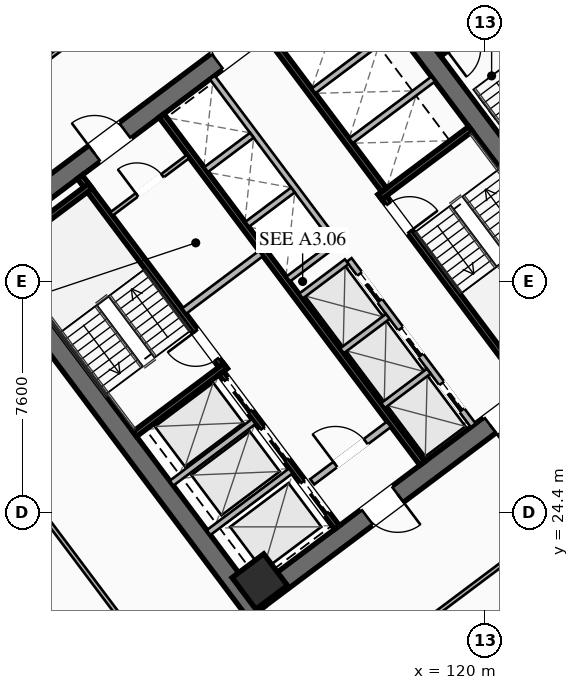
"""IFC4 building model, lengths in metres.
Left out: names, types, materials, properties, quantities, classifications, styles, units other than length and angle.
Written with IfcOpenShell. Run it as: python <this file> out.ifc"""

import sys

from ifc_helpers import new_model, si_unit, direction, frame, frame_2d, origin, origin_2d, place, context, subcontext, project, spatial, rectangle, hollow_rectangle, extrude, element, fill, save


model = new_model("IFC4")
c1 = context("Model", 3, precision=1e-05, world=origin(), true_north=direction((0.0, 1.0)))
c2 = subcontext(c1, "Body", "Model", "MODEL_VIEW")
j1 = project(units=[si_unit("LENGTHUNIT", "METRE"), si_unit("PLANEANGLEUNIT", "RADIAN")], contexts=[c1])
p1 = place(None, origin())
s1 = spatial("IfcSite", under=j1, at=p1, CompositionType="ELEMENT")
p2 = place(p1, origin())
s2 = spatial("IfcBuilding", under=s1, at=p2, CompositionType="ELEMENT")
p3 = place(p2, frame((0.0, 0.0, 92.05)))
s3 = spatial("IfcBuildingStorey", under=s2, at=p3, CompositionType="ELEMENT", Elevation=92.05)
for number, where, z_axis, x_axis in (
    (1, (112.476, 21.107, 0.0), (0.0, 0.0, 1.0), (-0.6, 0.8, 0.0)),
    (2, (115.524, 42.893, 0.0), (0.0, 0.0, 1.0), (0.6, -0.8, 0.0)),
):
    element("IfcWall", number, at=place(p3, frame(where, z_axis=z_axis, x_axis=x_axis)), inside=s3, PredefinedType="SHEAR", context=c2, shape_type="SweptSolid", body=[
        extrude(rectangle(XDim=15.6, YDim=0.65, at=frame_2d((7.8, 0.0))), origin(), (0.0, 0.0, 1.0), 3.55),
    ])
p4 = place(p3, frame((124.429, 30.478, 0.0), z_axis=(0.0, 0.0, 1.0), x_axis=(-0.799998028465, -0.600002628705, 0.0)))
e3 = element("IfcWall", 3, at=p4, inside=s3, PredefinedType="SHEAR", context=c2, shape_type="SweptSolid", body=[
    extrude(rectangle(XDim=14.86, YDim=0.65, at=frame_2d((7.43, 0.0))), origin(), (0.0, 0.0, 1.0), 3.55),
])
p5 = place(p4, frame((9.13, 0.0, 0.0)))
e4 = element("IfcOpeningElement", 4, at=p5, cuts=e3, PredefinedType="OPENING", context=c2, shape_type="SweptSolid", body=[
    extrude(rectangle(XDim=1.25, YDim=2.25, at=frame_2d((0.625, 1.125))), frame((0.0, 0.335, 0.0), z_axis=(0.0, -1.0, 0.0), x_axis=(1.0, 0.0, 0.0)), (0.0, 0.0, 1.0), 0.67),
])
p6 = place(p4, frame((4.08, 0.0, 0.0)))
e5 = element("IfcOpeningElement", 5, at=p6, cuts=e3, PredefinedType="OPENING", context=c2, shape_type="SweptSolid", body=[
    extrude(rectangle(XDim=1.25, YDim=2.25, at=frame_2d((0.625, 1.125))), frame((0.0, 0.335, 0.0), z_axis=(0.0, -1.0, 0.0), x_axis=(1.0, 0.0, 0.0)), (0.0, 0.0, 1.0), 0.67),
])
p7 = place(p3, frame((103.571, 33.522, 0.0), z_axis=(0.0, 0.0, 1.0), x_axis=(0.799998028465, 0.600002628705, 0.0)))
e6 = element("IfcWall", 6, at=p7, inside=s3, PredefinedType="SHEAR", context=c2, shape_type="SweptSolid", body=[
    extrude(rectangle(XDim=14.86, YDim=0.65, at=frame_2d((7.43, 0.0))), origin(), (0.0, 0.0, 1.0), 3.55),
])
p8 = place(p7, frame((4.48, 0.0, 0.0)))
e7 = element("IfcOpeningElement", 7, at=p8, cuts=e6, PredefinedType="OPENING", context=c2, shape_type="SweptSolid", body=[
    extrude(rectangle(XDim=1.25, YDim=2.25, at=frame_2d((0.625, 1.125))), frame((0.0, 0.335, 0.0), z_axis=(0.0, -1.0, 0.0), x_axis=(1.0, 0.0, 0.0)), (0.0, 0.0, 1.0), 0.67),
])
p9 = place(p7, frame((9.53, 0.0, 0.0)))
e8 = element("IfcOpeningElement", 8, at=p9, cuts=e6, PredefinedType="OPENING", context=c2, shape_type="SweptSolid", body=[
    extrude(rectangle(XDim=1.25, YDim=2.25, at=frame_2d((0.625, 1.125))), frame((0.0, 0.335, 0.0), z_axis=(0.0, -1.0, 0.0), x_axis=(1.0, 0.0, 0.0)), (0.0, 0.0, 1.0), 0.67),
])
p10 = place(p3, frame((112.59, 22.13, 0.0), z_axis=(0.0, 0.0, 1.0), x_axis=(0.799999996291, 0.600000004945, 0.0)))
e9 = element("IfcColumn", 9, at=p10, inside=s3, PredefinedType="COLUMN", context=c2, shape_type="SweptSolid", body=[
    extrude(hollow_rectangle(XDim=1.3, YDim=1.3, WallThickness=0.05, at=origin_2d()), origin(), (0.0, 0.0, 1.0), 3.35),
])
p11 = place(p3, frame((111.44, 29.08, 0.0), z_axis=(0.0, 0.0, 1.0), x_axis=(-0.600009827119, 0.799992629566, 0.0)))
e10 = element("IfcWall", 10, at=p11, inside=s3, PredefinedType="SHEAR", context=c2, shape_type="SweptSolid", body=[
    extrude(rectangle(XDim=7.95, YDim=0.2, at=frame_2d((3.975, 0.0))), origin(), (0.0, 0.0, 1.0), 3.35),
])
p12 = place(p11, frame((0.45, 0.0, 0.0)))
e11 = element("IfcOpeningElement", 11, at=p12, cuts=e10, PredefinedType="OPENING", context=c2, shape_type="SweptSolid", body=[
    extrude(rectangle(XDim=1.15, YDim=2.2, at=frame_2d((0.575, 1.1))), frame((0.0, 0.11, 0.0), z_axis=(0.0, -1.0, 0.0), x_axis=(1.0, 0.0, 0.0)), (0.0, 0.0, 1.0), 0.22),
])
for number, where, z_axis, x_axis in (
    (12, (108.476, 26.982, 0.0), (0.0, 0.0, 1.0), (0.8, 0.6, 0.0)),
    (13, (104.036, 32.902, 0.0), (0.0, 0.0, 1.0), (0.8, 0.6, 0.0)),
):
    element("IfcWall", number, at=place(p3, frame(where, z_axis=z_axis, x_axis=x_axis)), inside=s3, PredefinedType="SHEAR", context=c2, shape_type="SweptSolid", body=[
        extrude(rectangle(XDim=3.73, YDim=0.2, at=frame_2d((1.865, 0.0))), origin(), (0.0, 0.0, 1.0), 3.35),
    ])
p13 = place(p3, frame((116.56, 34.92, 0.0), z_axis=(0.0, 0.0, 1.0), x_axis=(0.600009827119, -0.799992629566, 0.0)))
e14 = element("IfcWall", 14, at=p13, inside=s3, PredefinedType="SHEAR", context=c2, shape_type="SweptSolid", body=[
    extrude(rectangle(XDim=7.95, YDim=0.2, at=frame_2d((3.975, 0.0))), origin(), (0.0, 0.0, 1.0), 3.35),
])
p14 = place(p13, frame((0.45, 0.0, 0.0)))
e15 = element("IfcOpeningElement", 15, at=p14, cuts=e14, PredefinedType="OPENING", context=c2, shape_type="SweptSolid", body=[
    extrude(rectangle(XDim=1.15, YDim=2.2, at=frame_2d((0.575, 1.1))), frame((0.0, 0.11, 0.0), z_axis=(0.0, -1.0, 0.0), x_axis=(1.0, 0.0, 0.0)), (0.0, 0.0, 1.0), 0.22),
])
p15 = place(p3, frame((116.54, 34.78, 0.0), z_axis=(0.0, 0.0, 1.0), x_axis=(0.799984290658, 0.600020945218, 0.0)))
e16 = element("IfcWall", 16, at=p15, inside=s3, PredefinedType="SHEAR", context=c2, shape_type="SweptSolid", body=[
    extrude(rectangle(XDim=3.73, YDim=0.2, at=frame_2d((1.865, 0.0))), origin(), (0.0, 0.0, 1.0), 3.35),
])
p16 = place(p3, frame((117.938, 26.016, 0.0), z_axis=(0.0, 0.0, 1.0), x_axis=(-0.600005463273, 0.799995902516, 0.0)))
e17 = element("IfcWall", 17, at=p16, inside=s3, PredefinedType="SHEAR", context=c2, shape_type="SweptSolid", body=[
    extrude(rectangle(XDim=14.3, YDim=0.2, at=frame_2d((7.15, 0.0))), origin(), (0.0, 0.0, 1.0), 3.35),
])
p17 = place(p3, frame((110.104, 31.028, 0.0), z_axis=(0.0, 0.0, 1.0), x_axis=(0.800018601094, 0.59997519774, 0.0)))
e18 = element("IfcWall", 18, at=p17, inside=s3, PredefinedType="SOLIDWALL", context=c2, shape_type="SweptSolid", body=[
    extrude(rectangle(XDim=3.15, YDim=0.22, at=frame_2d((1.575, 0.0))), origin(), (0.0, 0.0, 1.0), 2.703),
])
p18 = place(p3, frame((114.316, 25.412, 0.0), z_axis=(0.0, 0.0, 1.0), x_axis=(0.800018601094, 0.59997519774, 0.0)))
e19 = element("IfcWall", 19, at=p18, inside=s3, PredefinedType="SOLIDWALL", context=c2, shape_type="SweptSolid", body=[
    extrude(rectangle(XDim=3.15, YDim=0.22, at=frame_2d((1.575, 0.0))), origin(), (0.0, 0.0, 1.0), 2.703),
])
p19 = place(p18, frame((0.95, 0.0, 0.0)))
e20 = element("IfcOpeningElement", 20, at=p19, cuts=e19, PredefinedType="OPENING", context=c2, shape_type="SweptSolid", body=[
    extrude(rectangle(XDim=1.25, YDim=2.25, at=frame_2d((0.625, 1.125))), frame((0.0, 0.12, 0.0), z_axis=(0.0, -1.0, 0.0), x_axis=(1.0, 0.0, 0.0)), (0.0, 0.0, 1.0), 0.24),
])
p20 = place(p3, frame((115.13, 23.91, 0.0), z_axis=(0.0, 0.0, 1.0), x_axis=(-0.599975393228, 0.800018454488, 0.0)))
e21 = element("IfcWall", 21, at=p20, inside=s3, PredefinedType="SHEAR", context=c2, shape_type="SweptSolid", body=[
    extrude(rectangle(XDim=6.35, YDim=0.2, at=frame_2d((3.175, 0.0))), origin(), (0.0, 0.0, 1.0), 3.35),
])
p21 = place(p20, frame((4.775, 0.0, 0.0)))
e22 = element("IfcOpeningElement", 22, at=p21, cuts=e21, PredefinedType="OPENING", context=c2, shape_type="SweptSolid", body=[
    extrude(rectangle(XDim=1.3, YDim=2.25, at=frame_2d((0.65, 1.125))), frame((0.0, 0.11, 0.0), z_axis=(0.0, -1.0, 0.0), x_axis=(1.0, 0.0, 0.0)), (0.0, 0.0, 1.0), 0.22),
])
p22 = place(p20, frame((2.775, 0.0, 0.0)))
e23 = element("IfcOpeningElement", 23, at=p22, cuts=e21, PredefinedType="OPENING", context=c2, shape_type="SweptSolid", body=[
    extrude(rectangle(XDim=1.3, YDim=2.25, at=frame_2d((0.65, 1.125))), frame((0.0, 0.11, 0.0), z_axis=(0.0, -1.0, 0.0), x_axis=(1.0, 0.0, 0.0)), (0.0, 0.0, 1.0), 0.22),
])
p23 = place(p20, frame((0.575, 0.0, 0.0)))
e24 = element("IfcOpeningElement", 24, at=p23, cuts=e21, PredefinedType="OPENING", context=c2, shape_type="SweptSolid", body=[
    extrude(rectangle(XDim=1.3, YDim=2.25, at=frame_2d((0.65, 1.125))), frame((0.0, 0.11, 0.0), z_axis=(0.0, -1.0, 0.0), x_axis=(1.0, 0.0, 0.0)), (0.0, 0.0, 1.0), 0.22),
])
for number, where, z_axis, x_axis in (
    (25, (110.906, 23.742, 0.0), (0.0, 0.0, 1.0), (0.8, 0.6, 0.0)),
    (26, (109.688, 25.366, 0.0), (0.0, 0.0, 1.0), (0.8, 0.6, 0.0)),
):
    element("IfcWall", number, at=place(p3, frame(where, z_axis=z_axis, x_axis=x_axis)), inside=s3, PredefinedType="SOLIDWALL", context=c2, shape_type="SweptSolid", body=[
        extrude(rectangle(XDim=3.38, YDim=0.2, at=frame_2d((1.69, 0.0))), origin(), (0.0, 0.0, 1.0), 3.35),
    ])
p24 = place(p3, frame((112.87, 40.09, 0.0), z_axis=(0.0, 0.0, 1.0), x_axis=(0.599975393228, -0.800018454488, 0.0)))
e27 = element("IfcWall", 27, at=p24, inside=s3, PredefinedType="SHEAR", context=c2, shape_type="SweptSolid", body=[
    extrude(rectangle(XDim=6.35, YDim=0.2, at=frame_2d((3.175, 0.0))), origin(), (0.0, 0.0, 1.0), 3.35),
])
for number, where, z_axis, x_axis in (
    (28, (115.59, 36.63, 0.0), (0.0, 0.0, 1.0), (0.8, 0.6, 0.0)),
    (29, (114.36, 38.27, 0.0), (0.0, 0.0, 1.0), (0.8, 0.6, 0.0)),
):
    element("IfcWall", number, at=place(p3, frame(where, z_axis=z_axis, x_axis=x_axis)), inside=s3, PredefinedType="SOLIDWALL", context=c2, shape_type="SweptSolid", body=[
        extrude(rectangle(XDim=3.38, YDim=0.2, at=frame_2d((1.69, 0.0))), origin(), (0.0, 0.0, 1.0), 3.35),
    ])
p25 = place(p3, frame((107.71, 34.22, 0.0), z_axis=(0.0, 0.0, 1.0), x_axis=(0.799981399002, 0.60002480053, 0.0)))
e30 = element("IfcWall", 30, at=p25, inside=s3, PredefinedType="PARTITIONING", context=c2, shape_type="SweptSolid", body=[
    extrude(rectangle(XDim=3.15, YDim=0.135, at=frame_2d((1.575, 0.0))), origin(), (0.0, 0.0, 1.0), 2.703),
])
p26 = place(p25, frame((1.05, 0.0, 0.0)))
e31 = element("IfcOpeningElement", 31, at=p26, cuts=e30, PredefinedType="OPENING", context=c2, shape_type="SweptSolid", body=[
    extrude(rectangle(XDim=1.05, YDim=2.2, at=frame_2d((0.525, 1.1))), frame((0.0, 0.077, 0.0), z_axis=(0.0, -1.0, 0.0), x_axis=(1.0, 0.0, 0.0)), (0.0, 0.0, 1.0), 0.155),
])
p27 = place(p3, frame((119.61, 27.27, 0.0), z_axis=(0.0, 0.0, 1.0), x_axis=(-0.600011488909, 0.79999138319, 0.0)))
e32 = element("IfcWall", 32, at=p27, inside=s3, PredefinedType="SOLIDWALL", context=c2, shape_type="SweptSolid", body=[
    extrude(rectangle(XDim=6.8, YDim=0.2, at=frame_2d((3.4, 0.0))), origin(), (0.0, 0.0, 1.0), 3.35),
])
p28 = place(p27, frame((0.625, 0.0, 0.0)))
e33 = element("IfcOpeningElement", 33, at=p28, cuts=e32, PredefinedType="OPENING", context=c2, shape_type="SweptSolid", body=[
    extrude(rectangle(XDim=1.1, YDim=2.2, at=frame_2d((0.55, 1.1))), frame((0.0, 0.11, 0.0), z_axis=(0.0, -1.0, 0.0), x_axis=(1.0, 0.0, 0.0)), (0.0, 0.0, 1.0), 0.22),
])
p29 = place(p27, frame((2.875, 0.0, 0.0)))
e34 = element("IfcOpeningElement", 34, at=p29, cuts=e32, PredefinedType="OPENING", context=c2, shape_type="SweptSolid", body=[
    extrude(rectangle(XDim=1.1, YDim=2.2, at=frame_2d((0.55, 1.1))), frame((0.0, 0.11, 0.0), z_axis=(0.0, -1.0, 0.0), x_axis=(1.0, 0.0, 0.0)), (0.0, 0.0, 1.0), 0.22),
])
p30 = place(p27, frame((5.125, 0.0, 0.0)))
e35 = element("IfcOpeningElement", 35, at=p30, cuts=e32, PredefinedType="OPENING", context=c2, shape_type="SweptSolid", body=[
    extrude(rectangle(XDim=1.1, YDim=2.2, at=frame_2d((0.55, 1.1))), frame((0.0, 0.11, 0.0), z_axis=(0.0, -1.0, 0.0), x_axis=(1.0, 0.0, 0.0)), (0.0, 0.0, 1.0), 0.22),
])
p31 = place(p3, frame((116.646, 27.922, 0.0), z_axis=(0.0, 0.0, 1.0), x_axis=(0.8, 0.6, 0.0)))
e36 = element("IfcWall", 36, at=p31, inside=s3, PredefinedType="SOLIDWALL", context=c2, shape_type="SweptSolid", body=[
    extrude(rectangle(XDim=1.88, YDim=0.2, at=frame_2d((0.94, 0.0))), origin(), (0.0, 0.0, 1.0), 3.35),
])
p32 = place(p3, frame((115.296, 29.722, 0.0), z_axis=(0.0, 0.0, 1.0), x_axis=(0.799984418148, 0.600020775241, 0.0)))
e37 = element("IfcWall", 37, at=p32, inside=s3, PredefinedType="SOLIDWALL", context=c2, shape_type="SweptSolid", body=[
    extrude(rectangle(XDim=1.88, YDim=0.2, at=frame_2d((0.94, 0.0))), origin(), (0.0, 0.0, 1.0), 3.35),
])
p33 = place(p3, frame((113.946, 31.522, 0.0), z_axis=(0.0, 0.0, 1.0), x_axis=(0.8, 0.6, 0.0)))
e38 = element("IfcWall", 38, at=p33, inside=s3, PredefinedType="SOLIDWALL", context=c2, shape_type="SweptSolid", body=[
    extrude(rectangle(XDim=1.88, YDim=0.2, at=frame_2d((0.94, 0.0))), origin(), (0.0, 0.0, 1.0), 3.35),
])
p34 = place(p3, frame((115.11, 33.27, 0.0), z_axis=(0.0, 0.0, 1.0), x_axis=(-0.600011488909, 0.79999138319, 0.0)))
e39 = element("IfcWall", 39, at=p34, inside=s3, PredefinedType="SOLIDWALL", context=c2, shape_type="SweptSolid", body=[
    extrude(rectangle(XDim=6.8, YDim=0.2, at=frame_2d((3.4, 0.0))), origin(), (0.0, 0.0, 1.0), 3.35),
])
p35 = place(p3, frame((113.526, 32.082, 0.0), z_axis=(0.0, 0.0, 1.0), x_axis=(0.800046745961, 0.599937666993, 0.0)))
e40 = element("IfcWall", 40, at=p35, inside=s3, PredefinedType="SOLIDWALL", context=c2, shape_type="SweptSolid", body=[
    extrude(rectangle(XDim=1.88, YDim=0.2, at=frame_2d((0.94, 0.0))), origin(), (0.0, 0.0, 1.0), 3.35),
])
p36 = place(p3, frame((112.176, 33.882, 0.0), z_axis=(0.0, 0.0, 1.0), x_axis=(0.8, 0.6, 0.0)))
e41 = element("IfcWall", 41, at=p36, inside=s3, PredefinedType="SOLIDWALL", context=c2, shape_type="SweptSolid", body=[
    extrude(rectangle(XDim=1.88, YDim=0.2, at=frame_2d((0.94, 0.0))), origin(), (0.0, 0.0, 1.0), 3.35),
])
p37 = place(p3, frame((110.826, 35.682, 0.0), z_axis=(0.0, 0.0, 1.0), x_axis=(0.799984418148, 0.600020775241, 0.0)))
e42 = element("IfcWall", 42, at=p37, inside=s3, PredefinedType="SOLIDWALL", context=c2, shape_type="SweptSolid", body=[
    extrude(rectangle(XDim=1.88, YDim=0.2, at=frame_2d((0.94, 0.0))), origin(), (0.0, 0.0, 1.0), 3.35),
])
p38 = place(p3, frame((121.204, 41.528, 0.0), z_axis=(0.0, 0.0, 1.0), x_axis=(-0.800017232136, -0.599977023131, 0.0)))
e43 = element("IfcWall", 43, at=p38, inside=s3, PredefinedType="SHEAR", context=c2, shape_type="SweptSolid", body=[
    extrude(rectangle(XDim=3.4, YDim=0.2, at=frame_2d((1.7, 0.0))), origin(), (0.0, 0.0, 1.0), 3.35),
])
p39 = place(p38, frame((1.975, 0.0, 0.0)))
e44 = element("IfcOpeningElement", 44, at=p39, cuts=e43, PredefinedType="OPENING", context=c2, shape_type="SweptSolid", body=[
    extrude(rectangle(XDim=1.15, YDim=2.2, at=frame_2d((0.575, 1.1))), frame((0.0, 0.11, 0.0), z_axis=(0.0, -1.0, 0.0), x_axis=(1.0, 0.0, 0.0)), (0.0, 0.0, 1.0), 0.22),
])
p40 = place(p3, frame((98.316, 33.862, 0.0), z_axis=(0.0, 0.0, 1.0), x_axis=(0.8000041147, 0.599994513695, 0.0)))
e45 = element("IfcWall", 45, at=p40, inside=s3, PredefinedType="PARTITIONING", context=c2, shape_type="SweptSolid", body=[
    extrude(rectangle(XDim=28.48, YDim=0.135, at=frame_2d((14.24, 0.0))), origin(), (0.0, 0.0, 1.0), 2.703),
])
p41 = place(p40, frame((0.3, 0.0, 0.0)))
e46 = element("IfcOpeningElement", 46, at=p41, cuts=e45, PredefinedType="OPENING", context=c2, shape_type="SweptSolid", body=[
    extrude(rectangle(XDim=0.95, YDim=2.05, at=frame_2d((0.475, 1.025))), frame((0.0, 0.077, 0.0), z_axis=(0.0, -1.0, 0.0), x_axis=(1.0, 0.0, 0.0)), (0.0, 0.0, 1.0), 0.155),
])
p42 = place(p40, frame((7.195, 0.0, 0.0)))
e47 = element("IfcOpeningElement", 47, at=p42, cuts=e45, PredefinedType="OPENING", context=c2, shape_type="SweptSolid", body=[
    extrude(rectangle(XDim=0.95, YDim=2.05, at=frame_2d((0.475, 1.025))), frame((0.0, 0.077, 0.0), z_axis=(0.0, -1.0, 0.0), x_axis=(1.0, 0.0, 0.0)), (0.0, 0.0, 1.0), 0.155),
])
p43 = place(p40, frame((11.222, 0.0, 0.0)))
e48 = element("IfcOpeningElement", 48, at=p43, cuts=e45, PredefinedType="OPENING", context=c2, shape_type="SweptSolid", body=[
    extrude(rectangle(XDim=0.95, YDim=2.05, at=frame_2d((0.475, 1.025))), frame((0.0, 0.077, 0.0), z_axis=(0.0, -1.0, 0.0), x_axis=(1.0, 0.0, 0.0)), (0.0, 0.0, 1.0), 0.155),
])
p44 = place(p40, frame((27.23, 0.0, 0.0)))
e49 = element("IfcOpeningElement", 49, at=p44, cuts=e45, PredefinedType="OPENING", context=c2, shape_type="SweptSolid", body=[
    extrude(rectangle(XDim=0.95, YDim=2.05, at=frame_2d((0.475, 1.025))), frame((0.0, 0.077, 0.0), z_axis=(0.0, -1.0, 0.0), x_axis=(1.0, 0.0, 0.0)), (0.0, 0.0, 1.0), 0.155),
])
p45 = place(p3, frame((134.462, 33.134, 0.0), z_axis=(0.0, 0.0, 1.0), x_axis=(-0.799996913945, -0.600004114717, 0.0)))
e50 = element("IfcWall", 50, at=p45, inside=s3, PredefinedType="PARTITIONING", context=c2, shape_type="SweptSolid", body=[
    extrude(rectangle(XDim=28.48, YDim=0.135, at=frame_2d((14.24, 0.0))), origin(), (0.0, 0.0, 1.0), 2.703),
])
p46 = place(p45, frame((27.15, 0.0, 0.0)))
e51 = element("IfcOpeningElement", 51, at=p46, cuts=e50, PredefinedType="OPENING", context=c2, shape_type="SweptSolid", body=[
    extrude(rectangle(XDim=0.95, YDim=2.05, at=frame_2d((0.475, 1.025))), frame((0.0, 0.077, 0.0), z_axis=(0.0, -1.0, 0.0), x_axis=(1.0, 0.0, 0.0)), (0.0, 0.0, 1.0), 0.155),
])
p47 = place(p45, frame((0.38, 0.0, 0.0)))
e52 = element("IfcOpeningElement", 52, at=p47, cuts=e50, PredefinedType="OPENING", context=c2, shape_type="SweptSolid", body=[
    extrude(rectangle(XDim=0.95, YDim=2.05, at=frame_2d((0.475, 1.025))), frame((0.0, 0.077, 0.0), z_axis=(0.0, -1.0, 0.0), x_axis=(1.0, 0.0, 0.0)), (0.0, 0.0, 1.0), 0.155),
])
p48 = place(p3, frame((111.63, 16.11, 0.0), z_axis=(0.0, 0.0, 1.0), x_axis=(-0.599996466511, 0.800002650104, 0.0)))
e53 = element("IfcWall", 53, at=p48, inside=s3, PredefinedType="PARTITIONING", context=c2, shape_type="SweptSolid", body=[
    extrude(rectangle(XDim=22.11, YDim=0.135, at=frame_2d((11.055, 0.0))), origin(), (0.0, 0.0, 1.0), 2.703),
])
p49 = place(p48, frame((0.3, 0.0, 0.0)))
e54 = element("IfcOpeningElement", 54, at=p49, cuts=e53, PredefinedType="OPENING", context=c2, shape_type="SweptSolid", body=[
    extrude(rectangle(XDim=0.95, YDim=2.05, at=frame_2d((0.475, 1.025))), frame((0.0, 0.077, 0.0), z_axis=(0.0, -1.0, 0.0), x_axis=(1.0, 0.0, 0.0)), (0.0, 0.0, 1.0), 0.155),
])
p50 = place(p8, origin())
e55 = element("IfcDoor", 55, at=p50, inside=s3, OperationType="SINGLE_SWING_LEFT", PredefinedType="DOOR", context=c2, shape_type="SweptSolid", body=[
    extrude(rectangle(XDim=1.25, YDim=2.25, at=frame_2d((0.625, 1.125))), frame((0.0, 0.025, 0.0), z_axis=(0.0, -1.0, 0.0), x_axis=(1.0, 0.0, 0.0)), (0.0, 0.0, 1.0), 0.05),
])
fill(e7, e55)
p51 = place(p9, origin())
e56 = element("IfcDoor", 56, at=p51, inside=s3, OperationType="SINGLE_SWING_RIGHT", PredefinedType="DOOR", context=c2, shape_type="SweptSolid", body=[
    extrude(rectangle(XDim=1.25, YDim=2.25, at=frame_2d((0.625, 1.125))), frame((0.0, 0.025, 0.0), z_axis=(0.0, -1.0, 0.0), x_axis=(1.0, 0.0, 0.0)), (0.0, 0.0, 1.0), 0.05),
])
fill(e8, e56)
p52 = place(p5, origin())
e57 = element("IfcDoor", 57, at=p52, inside=s3, OperationType="SINGLE_SWING_LEFT", PredefinedType="DOOR", context=c2, shape_type="SweptSolid", body=[
    extrude(rectangle(XDim=1.25, YDim=2.25, at=frame_2d((0.625, 1.125))), frame((0.0, 0.025, 0.0), z_axis=(0.0, -1.0, 0.0), x_axis=(1.0, 0.0, 0.0)), (0.0, 0.0, 1.0), 0.05),
])
fill(e4, e57)
p53 = place(p6, origin())
e58 = element("IfcDoor", 58, at=p53, inside=s3, OperationType="SINGLE_SWING_RIGHT", PredefinedType="DOOR", context=c2, shape_type="SweptSolid", body=[
    extrude(rectangle(XDim=1.25, YDim=2.25, at=frame_2d((0.625, 1.125))), frame((0.0, 0.025, 0.0), z_axis=(0.0, -1.0, 0.0), x_axis=(1.0, 0.0, 0.0)), (0.0, 0.0, 1.0), 0.05),
])
fill(e5, e58)
p54 = place(p12, origin())
e59 = element("IfcDoor", 59, at=p54, inside=s3, OperationType="SINGLE_SWING_RIGHT", PredefinedType="DOOR", context=c2, shape_type="SweptSolid", body=[
    extrude(rectangle(XDim=1.15, YDim=2.2, at=frame_2d((0.575, 1.1))), frame((0.0, 0.025, 0.0), z_axis=(0.0, -1.0, 0.0), x_axis=(1.0, 0.0, 0.0)), (0.0, 0.0, 1.0), 0.05),
])
fill(e11, e59)
p55 = place(p14, origin())
e60 = element("IfcDoor", 60, at=p55, inside=s3, OperationType="SINGLE_SWING_RIGHT", PredefinedType="DOOR", context=c2, shape_type="SweptSolid", body=[
    extrude(rectangle(XDim=1.15, YDim=2.2, at=frame_2d((0.575, 1.1))), frame((0.0, 0.025, 0.0), z_axis=(0.0, -1.0, 0.0), x_axis=(1.0, 0.0, 0.0)), (0.0, 0.0, 1.0), 0.05),
])
fill(e15, e60)
p56 = place(p19, origin())
e61 = element("IfcDoor", 61, at=p56, inside=s3, OperationType="SINGLE_SWING_LEFT", PredefinedType="DOOR", context=c2, shape_type="SweptSolid", body=[
    extrude(rectangle(XDim=1.25, YDim=2.25, at=frame_2d((0.625, 1.125))), frame((0.0, 0.025, 0.0), z_axis=(0.0, -1.0, 0.0), x_axis=(1.0, 0.0, 0.0)), (0.0, 0.0, 1.0), 0.05),
])
fill(e20, e61)
p57 = place(p26, origin())
e62 = element("IfcDoor", 62, at=p57, inside=s3, OperationType="SINGLE_SWING_LEFT", PredefinedType="DOOR", context=c2, shape_type="SweptSolid", body=[
    extrude(rectangle(XDim=1.05, YDim=2.2, at=frame_2d((0.525, 1.1))), frame((0.0, 0.025, 0.0), z_axis=(0.0, -1.0, 0.0), x_axis=(1.0, 0.0, 0.0)), (0.0, 0.0, 1.0), 0.05),
])
fill(e31, e62)
p58 = place(p21, origin())
e63 = element("IfcDoor", 63, at=p58, inside=s3, OperationType="SLIDING_TO_LEFT", PredefinedType="DOOR", context=c2, shape_type="SweptSolid", body=[
    extrude(rectangle(XDim=1.3, YDim=2.25, at=frame_2d((0.65, 1.125))), frame((0.0, 0.025, 0.0), z_axis=(0.0, -1.0, 0.0), x_axis=(1.0, 0.0, 0.0)), (0.0, 0.0, 1.0), 0.05),
])
fill(e22, e63)
p59 = place(p22, origin())
e64 = element("IfcDoor", 64, at=p59, inside=s3, OperationType="SLIDING_TO_LEFT", PredefinedType="DOOR", context=c2, shape_type="SweptSolid", body=[
    extrude(rectangle(XDim=1.3, YDim=2.25, at=frame_2d((0.65, 1.125))), frame((0.0, 0.025, 0.0), z_axis=(0.0, -1.0, 0.0), x_axis=(1.0, 0.0, 0.0)), (0.0, 0.0, 1.0), 0.05),
])
fill(e23, e64)
p60 = place(p23, origin())
e65 = element("IfcDoor", 65, at=p60, inside=s3, OperationType="SLIDING_TO_LEFT", PredefinedType="DOOR", context=c2, shape_type="SweptSolid", body=[
    extrude(rectangle(XDim=1.3, YDim=2.25, at=frame_2d((0.65, 1.125))), frame((0.0, 0.025, 0.0), z_axis=(0.0, -1.0, 0.0), x_axis=(1.0, 0.0, 0.0)), (0.0, 0.0, 1.0), 0.05),
])
fill(e24, e65)
p61 = place(p28, origin())
e66 = element("IfcDoor", 66, at=p61, inside=s3, OperationType="SLIDING_TO_LEFT", PredefinedType="DOOR", context=c2, shape_type="SweptSolid", body=[
    extrude(rectangle(XDim=1.1, YDim=2.2, at=frame_2d((0.55, 1.1))), frame((0.0, 0.025, 0.0), z_axis=(0.0, -1.0, 0.0), x_axis=(1.0, 0.0, 0.0)), (0.0, 0.0, 1.0), 0.05),
])
fill(e33, e66)
p62 = place(p29, origin())
e67 = element("IfcDoor", 67, at=p62, inside=s3, OperationType="SLIDING_TO_LEFT", PredefinedType="DOOR", context=c2, shape_type="SweptSolid", body=[
    extrude(rectangle(XDim=1.1, YDim=2.2, at=frame_2d((0.55, 1.1))), frame((0.0, 0.025, 0.0), z_axis=(0.0, -1.0, 0.0), x_axis=(1.0, 0.0, 0.0)), (0.0, 0.0, 1.0), 0.05),
])
fill(e34, e67)
p63 = place(p30, origin())
e68 = element("IfcDoor", 68, at=p63, inside=s3, OperationType="SLIDING_TO_LEFT", PredefinedType="DOOR", context=c2, shape_type="SweptSolid", body=[
    extrude(rectangle(XDim=1.1, YDim=2.2, at=frame_2d((0.55, 1.1))), frame((0.0, 0.025, 0.0), z_axis=(0.0, -1.0, 0.0), x_axis=(1.0, 0.0, 0.0)), (0.0, 0.0, 1.0), 0.05),
])
fill(e35, e68)
save(model, sys.argv[1])
